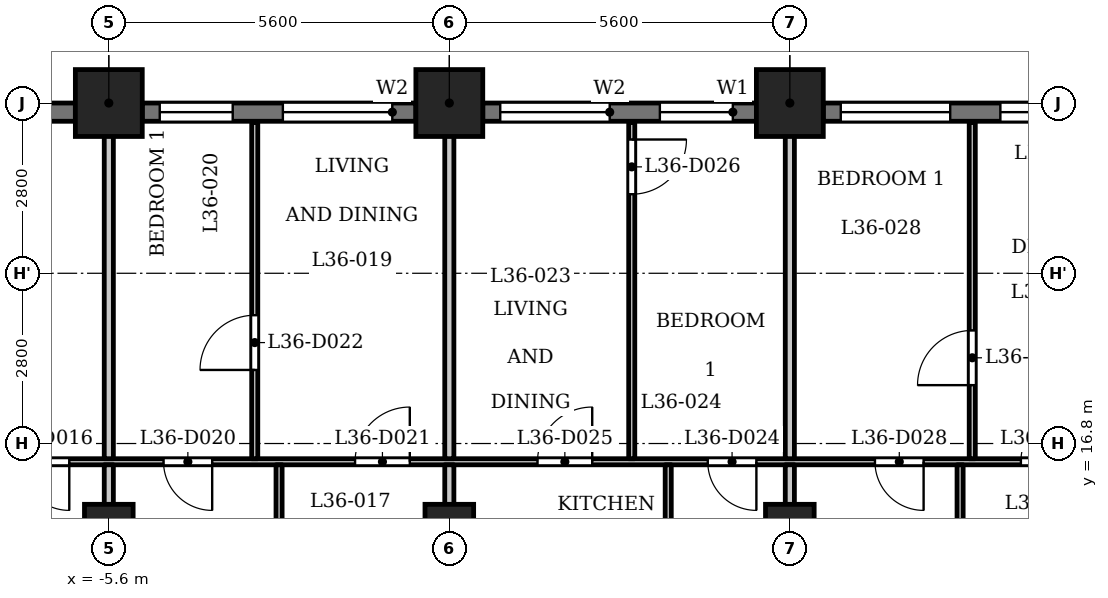
"""IFC4 building model, lengths in metres.
Left out: names, types, materials, properties, quantities, classifications, styles, units other than length and angle.
Written with IfcOpenShell. Run it as: python <this file> out.ifc"""

import sys

from ifc_helpers import new_model, si_unit, direction, frame, frame_2d, origin, origin_2d, place, context, subcontext, project, spatial, rectangle, extrude, element, fill, save


model = new_model("IFC4")
c1 = context("Model", 3, precision=1e-05, world=origin(), true_north=direction((0.0, 1.0)))
c2 = subcontext(c1, "Body", "Model", "MODEL_VIEW")
j1 = project(units=[si_unit("LENGTHUNIT", "METRE"), si_unit("PLANEANGLEUNIT", "RADIAN")], contexts=[c1])
p1 = place(None, origin())
s1 = spatial("IfcSite", under=j1, at=p1, CompositionType="ELEMENT")
p2 = place(p1, origin())
s2 = spatial("IfcBuilding", under=s1, at=p2, CompositionType="ELEMENT")
p3 = place(p2, frame((0.0, 0.0, 143.1)))
s3 = spatial("IfcBuildingStorey", under=s2, at=p3, CompositionType="ELEMENT", Elevation=143.1)
for number, where, z_axis, x_axis in (
    (1, (5.6, 22.4, 0.0), (0.0, 0.0, 1.0), (1.0, 0.0, 0.0)),
    (2, (0.0, 22.4, 0.0), (0.0, 0.0, 1.0), (1.0, 0.0, 0.0)),
    (3, (-5.6, 22.4, 0.0), (0.0, 0.0, 1.0), (1.0, 0.0, 0.0)),
):
    element("IfcColumn", number, at=place(p3, frame(where, z_axis=z_axis, x_axis=x_axis)), inside=s3, PredefinedType="COLUMN", context=c2, shape_type="SweptSolid", body=[
        extrude(rectangle(XDim=1.1, YDim=1.1, at=origin_2d()), origin(), (0.0, 0.0, 1.0), 3.5),
    ])
for number, where, z_axis, x_axis in (
    (4, (-5.6, 15.4, 0.0), (0.0, 0.0, 1.0), (1.0, 0.0, 0.0)),
    (5, (0.0, 15.4, 0.0), (0.0, 0.0, 1.0), (1.0, 0.0, 0.0)),
    (6, (5.6, 15.4, 0.0), (0.0, 0.0, 1.0), (1.0, 0.0, 0.0)),
):
    element("IfcColumn", number, at=place(p3, frame(where, z_axis=z_axis, x_axis=x_axis)), inside=s3, PredefinedType="COLUMN", context=c2, shape_type="SweptSolid", body=[
        extrude(rectangle(XDim=0.8, YDim=0.8, at=origin_2d()), origin(), (0.0, 0.0, 1.0), 3.5),
    ])
p4 = place(p3, frame((10.65, 22.25, 0.0), z_axis=(0.0, 0.0, 1.0), x_axis=(-1.0, 0.0, 0.0)))
e7 = element("IfcWall", 7, at=p4, inside=s3, PredefinedType="SOLIDWALL", context=c2, shape_type="SweptSolid", body=[
    extrude(rectangle(XDim=4.5, YDim=0.3, at=frame_2d((2.25, 0.0))), origin(), (0.0, 0.0, 1.0), 2.45),
])
p5 = place(p4, frame((0.387, 0.0, 0.6)))
e8 = element("IfcOpeningElement", 8, at=p5, cuts=e7, PredefinedType="OPENING", context=c2, shape_type="SweptSolid", body=[
    extrude(rectangle(XDim=1.2, YDim=1.55, at=frame_2d((0.6, 0.775))), frame((0.0, 0.16, 0.0), z_axis=(0.0, -1.0, 0.0), x_axis=(1.0, 0.0, 0.0)), (0.0, 0.0, 1.0), 0.32),
])
p6 = place(p4, frame((2.413, 0.0, 0.9)))
e9 = element("IfcOpeningElement", 9, at=p6, cuts=e7, PredefinedType="OPENING", context=c2, shape_type="SweptSolid", body=[
    extrude(rectangle(XDim=1.8, YDim=1.25, at=frame_2d((0.9, 0.625))), frame((0.0, 0.16, 0.0), z_axis=(0.0, -1.0, 0.0), x_axis=(1.0, 0.0, 0.0)), (0.0, 0.0, 1.0), 0.32),
])
p7 = place(p3, frame((5.05, 22.25, 0.0), z_axis=(0.0, 0.0, 1.0), x_axis=(-1.0, 0.0, 0.0)))
e10 = element("IfcWall", 10, at=p7, inside=s3, PredefinedType="SOLIDWALL", context=c2, shape_type="SweptSolid", body=[
    extrude(rectangle(XDim=4.5, YDim=0.3, at=frame_2d((2.25, 0.0))), origin(), (0.0, 0.0, 1.0), 2.45),
])
p8 = place(p7, frame((0.387, 0.0, 0.6)))
e11 = element("IfcOpeningElement", 11, at=p8, cuts=e10, PredefinedType="OPENING", context=c2, shape_type="SweptSolid", body=[
    extrude(rectangle(XDim=1.2, YDim=1.55, at=frame_2d((0.6, 0.775))), frame((0.0, 0.16, 0.0), z_axis=(0.0, -1.0, 0.0), x_axis=(1.0, 0.0, 0.0)), (0.0, 0.0, 1.0), 0.32),
])
p9 = place(p7, frame((2.413, 0.0, 0.9)))
e12 = element("IfcOpeningElement", 12, at=p9, cuts=e10, PredefinedType="OPENING", context=c2, shape_type="SweptSolid", body=[
    extrude(rectangle(XDim=1.8, YDim=1.25, at=frame_2d((0.9, 0.625))), frame((0.0, 0.16, 0.0), z_axis=(0.0, -1.0, 0.0), x_axis=(1.0, 0.0, 0.0)), (0.0, 0.0, 1.0), 0.32),
])
p10 = place(p3, frame((-0.55, 22.25, 0.0), z_axis=(0.0, 0.0, 1.0), x_axis=(-1.0, 0.0, 0.0)))
e13 = element("IfcWall", 13, at=p10, inside=s3, PredefinedType="SOLIDWALL", context=c2, shape_type="SweptSolid", body=[
    extrude(rectangle(XDim=4.5, YDim=0.3, at=frame_2d((2.25, 0.0))), origin(), (0.0, 0.0, 1.0), 2.45),
])
p11 = place(p10, frame((0.387, 0.0, 0.9)))
e14 = element("IfcOpeningElement", 14, at=p11, cuts=e13, PredefinedType="OPENING", context=c2, shape_type="SweptSolid", body=[
    extrude(rectangle(XDim=1.8, YDim=1.25, at=frame_2d((0.9, 0.625))), frame((0.0, 0.16, 0.0), z_axis=(0.0, -1.0, 0.0), x_axis=(1.0, 0.0, 0.0)), (0.0, 0.0, 1.0), 0.32),
])
p12 = place(p10, frame((3.012, 0.0, 0.6)))
e15 = element("IfcOpeningElement", 15, at=p12, cuts=e13, PredefinedType="OPENING", context=c2, shape_type="SweptSolid", body=[
    extrude(rectangle(XDim=1.2, YDim=1.55, at=frame_2d((0.6, 0.775))), frame((0.0, 0.16, 0.0), z_axis=(0.0, -1.0, 0.0), x_axis=(1.0, 0.0, 0.0)), (0.0, 0.0, 1.0), 0.32),
])
p13 = place(p3, frame((-6.15, 22.25, 0.0), z_axis=(0.0, 0.0, 1.0), x_axis=(-1.0, 0.0, 0.0)))
e16 = element("IfcWall", 16, at=p13, inside=s3, PredefinedType="SOLIDWALL", context=c2, shape_type="SweptSolid", body=[
    extrude(rectangle(XDim=4.5, YDim=0.3, at=frame_2d((2.25, 0.0))), origin(), (0.0, 0.0, 1.0), 2.45),
])
p14 = place(p13, frame((0.45, 0.0, 1.2)))
e17 = element("IfcOpeningElement", 17, at=p14, cuts=e16, PredefinedType="OPENING", context=c2, shape_type="SweptSolid", body=[
    extrude(rectangle(XDim=3.6, YDim=0.95, at=frame_2d((1.8, 0.475))), frame((0.0, 0.16, 0.0), z_axis=(0.0, -1.0, 0.0), x_axis=(1.0, 0.0, 0.0)), (0.0, 0.0, 1.0), 0.32),
])
p15 = place(p3, frame((-16.725, 16.5, 0.0), z_axis=(0.0, 0.0, 1.0), x_axis=(1.0, 0.0, 0.0)))
e18 = element("IfcWall", 18, at=p15, inside=s3, PredefinedType="PARTITIONING", context=c2, shape_type="SweptSolid", body=[
    extrude(rectangle(XDim=33.45, YDim=0.1, at=frame_2d((16.725, 0.0))), origin(), (0.0, 0.0, 1.0), 3.2),
])
p16 = place(p15, frame((9.675, 0.0, 0.0)))
e19 = element("IfcOpeningElement", 19, at=p16, cuts=e18, PredefinedType="OPENING", context=c2, shape_type="SweptSolid", body=[
    extrude(rectangle(XDim=0.8, YDim=2.1, at=frame_2d((0.4, 1.05))), frame((0.0, 0.06, 0.0), z_axis=(0.0, -1.0, 0.0), x_axis=(1.0, 0.0, 0.0)), (0.0, 0.0, 1.0), 0.12),
])
p17 = place(p15, frame((3.975, 0.0, 0.0)))
e20 = element("IfcOpeningElement", 20, at=p17, cuts=e18, PredefinedType="OPENING", context=c2, shape_type="SweptSolid", body=[
    extrude(rectangle(XDim=0.9, YDim=2.1, at=frame_2d((0.45, 1.05))), frame((0.0, 0.06, 0.0), z_axis=(0.0, -1.0, 0.0), x_axis=(1.0, 0.0, 0.0)), (0.0, 0.0, 1.0), 0.12),
])
p18 = place(p15, frame((12.025, 0.0, 0.0)))
e21 = element("IfcOpeningElement", 21, at=p18, cuts=e18, PredefinedType="OPENING", context=c2, shape_type="SweptSolid", body=[
    extrude(rectangle(XDim=0.8, YDim=2.1, at=frame_2d((0.4, 1.05))), frame((0.0, 0.06, 0.0), z_axis=(0.0, -1.0, 0.0), x_axis=(1.0, 0.0, 0.0)), (0.0, 0.0, 1.0), 0.12),
])
p19 = place(p15, frame((15.175, 0.0, 0.0)))
e22 = element("IfcOpeningElement", 22, at=p19, cuts=e18, PredefinedType="OPENING", context=c2, shape_type="SweptSolid", body=[
    extrude(rectangle(XDim=0.9, YDim=2.1, at=frame_2d((0.45, 1.05))), frame((0.0, 0.06, 0.0), z_axis=(0.0, -1.0, 0.0), x_axis=(1.0, 0.0, 0.0)), (0.0, 0.0, 1.0), 0.12),
])
p20 = place(p15, frame((20.975, 0.0, 0.0)))
e23 = element("IfcOpeningElement", 23, at=p20, cuts=e18, PredefinedType="OPENING", context=c2, shape_type="SweptSolid", body=[
    extrude(rectangle(XDim=0.8, YDim=2.1, at=frame_2d((0.4, 1.05))), frame((0.0, 0.06, 0.0), z_axis=(0.0, -1.0, 0.0), x_axis=(1.0, 0.0, 0.0)), (0.0, 0.0, 1.0), 0.12),
])
p21 = place(p15, frame((18.175, 0.0, 0.0)))
e24 = element("IfcOpeningElement", 24, at=p21, cuts=e18, PredefinedType="OPENING", context=c2, shape_type="SweptSolid", body=[
    extrude(rectangle(XDim=0.9, YDim=2.1, at=frame_2d((0.45, 1.05))), frame((0.0, 0.06, 0.0), z_axis=(0.0, -1.0, 0.0), x_axis=(1.0, 0.0, 0.0)), (0.0, 0.0, 1.0), 0.12),
])
p22 = place(p15, frame((23.725, 0.0, 0.0)))
e25 = element("IfcOpeningElement", 25, at=p22, cuts=e18, PredefinedType="OPENING", context=c2, shape_type="SweptSolid", body=[
    extrude(rectangle(XDim=0.8, YDim=2.1, at=frame_2d((0.4, 1.05))), frame((0.0, 0.06, 0.0), z_axis=(0.0, -1.0, 0.0), x_axis=(1.0, 0.0, 0.0)), (0.0, 0.0, 1.0), 0.12),
])
p23 = place(p15, frame((26.125, 0.0, 0.0)))
e26 = element("IfcOpeningElement", 26, at=p23, cuts=e18, PredefinedType="OPENING", context=c2, shape_type="SweptSolid", body=[
    extrude(rectangle(XDim=0.9, YDim=2.1, at=frame_2d((0.45, 1.05))), frame((0.0, 0.06, 0.0), z_axis=(0.0, -1.0, 0.0), x_axis=(1.0, 0.0, 0.0)), (0.0, 0.0, 1.0), 0.12),
])
p24 = place(p15, frame((32.125, 0.0, 0.0)))
e27 = element("IfcOpeningElement", 27, at=p24, cuts=e18, PredefinedType="OPENING", context=c2, shape_type="SweptSolid", body=[
    extrude(rectangle(XDim=0.8, YDim=2.1, at=frame_2d((0.4, 1.05))), frame((0.0, 0.06, 0.0), z_axis=(0.0, -1.0, 0.0), x_axis=(1.0, 0.0, 0.0)), (0.0, 0.0, 1.0), 0.12),
])
p25 = place(p15, frame((28.975, 0.0, 0.0)))
e28 = element("IfcOpeningElement", 28, at=p25, cuts=e18, PredefinedType="OPENING", context=c2, shape_type="SweptSolid", body=[
    extrude(rectangle(XDim=0.9, YDim=2.1, at=frame_2d((0.45, 1.05))), frame((0.0, 0.06, 0.0), z_axis=(0.0, -1.0, 0.0), x_axis=(1.0, 0.0, 0.0)), (0.0, 0.0, 1.0), 0.12),
])
p26 = place(p3, frame((-5.6, 13.275, 0.0), z_axis=(0.0, 0.0, 1.0), x_axis=(0.0, 1.0, 0.0)))
e29 = element("IfcWall", 29, at=p26, inside=s3, PredefinedType="PARTITIONING", context=c2, shape_type="SweptSolid", body=[
    extrude(rectangle(XDim=3.175, YDim=0.15, at=frame_2d((1.587, 0.0))), origin(), (0.0, 0.0, 1.0), 3.2),
])
p27 = place(p3, frame((-5.6, 16.55, 0.0), z_axis=(0.0, 0.0, 1.0), x_axis=(0.0, 1.0, 0.0)))
e30 = element("IfcWall", 30, at=p27, inside=s3, PredefinedType="PARTITIONING", context=c2, shape_type="SweptSolid", body=[
    extrude(rectangle(XDim=6.38, YDim=0.15, at=frame_2d((3.19, 0.0))), origin(), (0.0, 0.0, 1.0), 3.2),
])
p28 = place(p3, frame((-3.2, 16.55, 0.0), z_axis=(0.0, 0.0, 1.0), x_axis=(0.0, 1.0, 0.0)))
e31 = element("IfcWall", 31, at=p28, inside=s3, PredefinedType="PARTITIONING", context=c2, shape_type="SweptSolid", body=[
    extrude(rectangle(XDim=5.53, YDim=0.1, at=frame_2d((2.765, 0.0))), origin(), (0.0, 0.0, 1.0), 3.2),
])
p29 = place(p28, frame((1.46, 0.0, 0.0)))
e32 = element("IfcOpeningElement", 32, at=p29, cuts=e31, PredefinedType="OPENING", context=c2, shape_type="SweptSolid", body=[
    extrude(rectangle(XDim=0.9, YDim=2.1, at=frame_2d((0.45, 1.05))), frame((0.0, 0.06, 0.0), z_axis=(0.0, -1.0, 0.0), x_axis=(1.0, 0.0, 0.0)), (0.0, 0.0, 1.0), 0.12),
])
p30 = place(p3, frame((-2.8, 13.275, 0.0), z_axis=(0.0, 0.0, 1.0), x_axis=(0.0, 1.0, 0.0)))
e33 = element("IfcWall", 33, at=p30, inside=s3, PredefinedType="PARTITIONING", context=c2, shape_type="SweptSolid", body=[
    extrude(rectangle(XDim=3.175, YDim=0.1, at=frame_2d((1.587, 0.0))), origin(), (0.0, 0.0, 1.0), 3.2),
])
p31 = place(p3, frame((0.0, 13.275, 0.0), z_axis=(0.0, 0.0, 1.0), x_axis=(0.0, 1.0, 0.0)))
e34 = element("IfcWall", 34, at=p31, inside=s3, PredefinedType="PARTITIONING", context=c2, shape_type="SweptSolid", body=[
    extrude(rectangle(XDim=3.175, YDim=0.15, at=frame_2d((1.587, 0.0))), origin(), (0.0, 0.0, 1.0), 3.2),
])
p32 = place(p3, frame((0.0, 16.55, 0.0), z_axis=(0.0, 0.0, 1.0), x_axis=(0.0, 1.0, 0.0)))
e35 = element("IfcWall", 35, at=p32, inside=s3, PredefinedType="PARTITIONING", context=c2, shape_type="SweptSolid", body=[
    extrude(rectangle(XDim=6.38, YDim=0.15, at=frame_2d((3.19, 0.0))), origin(), (0.0, 0.0, 1.0), 3.2),
])
p33 = place(p3, frame((3.0, 16.55, 0.0), z_axis=(0.0, 0.0, 1.0), x_axis=(0.0, 1.0, 0.0)))
e36 = element("IfcWall", 36, at=p33, inside=s3, PredefinedType="PARTITIONING", context=c2, shape_type="SweptSolid", body=[
    extrude(rectangle(XDim=5.53, YDim=0.1, at=frame_2d((2.765, 0.0))), origin(), (0.0, 0.0, 1.0), 3.2),
])
p34 = place(p33, frame((4.35, 0.0, 0.0)))
e37 = element("IfcOpeningElement", 37, at=p34, cuts=e36, PredefinedType="OPENING", context=c2, shape_type="SweptSolid", body=[
    extrude(rectangle(XDim=0.9, YDim=2.1, at=frame_2d((0.45, 1.05))), frame((0.0, 0.06, 0.0), z_axis=(0.0, -1.0, 0.0), x_axis=(1.0, 0.0, 0.0)), (0.0, 0.0, 1.0), 0.12),
])
p35 = place(p3, frame((3.6, 13.275, 0.0), z_axis=(0.0, 0.0, 1.0), x_axis=(0.0, 1.0, 0.0)))
e38 = element("IfcWall", 38, at=p35, inside=s3, PredefinedType="PARTITIONING", context=c2, shape_type="SweptSolid", body=[
    extrude(rectangle(XDim=3.175, YDim=0.1, at=frame_2d((1.587, 0.0))), origin(), (0.0, 0.0, 1.0), 3.2),
])
p36 = place(p3, frame((5.6, 13.275, 0.0), z_axis=(0.0, 0.0, 1.0), x_axis=(0.0, 1.0, 0.0)))
e39 = element("IfcWall", 39, at=p36, inside=s3, PredefinedType="PARTITIONING", context=c2, shape_type="SweptSolid", body=[
    extrude(rectangle(XDim=3.175, YDim=0.15, at=frame_2d((1.587, 0.0))), origin(), (0.0, 0.0, 1.0), 3.2),
])
p37 = place(p3, frame((5.6, 16.55, 0.0), z_axis=(0.0, 0.0, 1.0), x_axis=(0.0, 1.0, 0.0)))
e40 = element("IfcWall", 40, at=p37, inside=s3, PredefinedType="PARTITIONING", context=c2, shape_type="SweptSolid", body=[
    extrude(rectangle(XDim=6.38, YDim=0.15, at=frame_2d((3.19, 0.0))), origin(), (0.0, 0.0, 1.0), 3.2),
])
p38 = place(p3, frame((8.4, 13.275, 0.0), z_axis=(0.0, 0.0, 1.0), x_axis=(0.0, 1.0, 0.0)))
e41 = element("IfcWall", 41, at=p38, inside=s3, PredefinedType="PARTITIONING", context=c2, shape_type="SweptSolid", body=[
    extrude(rectangle(XDim=3.175, YDim=0.1, at=frame_2d((1.587, 0.0))), origin(), (0.0, 0.0, 1.0), 3.2),
])
p39 = place(p3, frame((8.6, 16.55, 0.0), z_axis=(0.0, 0.0, 1.0), x_axis=(0.0, 1.0, 0.0)))
e42 = element("IfcWall", 42, at=p39, inside=s3, PredefinedType="PARTITIONING", context=c2, shape_type="SweptSolid", body=[
    extrude(rectangle(XDim=5.53, YDim=0.1, at=frame_2d((2.765, 0.0))), origin(), (0.0, 0.0, 1.0), 3.2),
])
p40 = place(p39, frame((1.21, 0.0, 0.0)))
e43 = element("IfcOpeningElement", 43, at=p40, cuts=e42, PredefinedType="OPENING", context=c2, shape_type="SweptSolid", body=[
    extrude(rectangle(XDim=0.9, YDim=2.1, at=frame_2d((0.45, 1.05))), frame((0.0, 0.06, 0.0), z_axis=(0.0, -1.0, 0.0), x_axis=(1.0, 0.0, 0.0)), (0.0, 0.0, 1.0), 0.12),
])
p41 = place(p16, origin())
e44 = element("IfcDoor", 44, at=p41, inside=s3, OperationType="SINGLE_SWING_RIGHT", PredefinedType="DOOR", context=c2, shape_type="SweptSolid", body=[
    extrude(rectangle(XDim=0.8, YDim=2.1, at=frame_2d((0.4, 1.05))), frame((0.0, 0.025, 0.0), z_axis=(0.0, -1.0, 0.0), x_axis=(1.0, 0.0, 0.0)), (0.0, 0.0, 1.0), 0.05),
])
fill(e19, e44)
p42 = place(p18, origin())
e45 = element("IfcDoor", 45, at=p42, inside=s3, OperationType="SINGLE_SWING_RIGHT", PredefinedType="DOOR", context=c2, shape_type="SweptSolid", body=[
    extrude(rectangle(XDim=0.8, YDim=2.1, at=frame_2d((0.4, 1.05))), frame((0.0, 0.025, 0.0), z_axis=(0.0, -1.0, 0.0), x_axis=(1.0, 0.0, 0.0)), (0.0, 0.0, 1.0), 0.05),
])
fill(e21, e45)
p43 = place(p19, origin())
e46 = element("IfcDoor", 46, at=p43, inside=s3, OperationType="SINGLE_SWING_LEFT", PredefinedType="DOOR", context=c2, shape_type="SweptSolid", body=[
    extrude(rectangle(XDim=0.9, YDim=2.1, at=frame_2d((0.45, 1.05))), frame((0.0, 0.025, 0.0), z_axis=(0.0, -1.0, 0.0), x_axis=(1.0, 0.0, 0.0)), (0.0, 0.0, 1.0), 0.05),
])
fill(e22, e46)
p44 = place(p29, origin())
e47 = element("IfcDoor", 47, at=p44, inside=s3, OperationType="SINGLE_SWING_RIGHT", PredefinedType="DOOR", context=c2, shape_type="SweptSolid", body=[
    extrude(rectangle(XDim=0.9, YDim=2.1, at=frame_2d((0.45, 1.05))), frame((0.0, 0.025, 0.0), z_axis=(0.0, -1.0, 0.0), x_axis=(1.0, 0.0, 0.0)), (0.0, 0.0, 1.0), 0.05),
])
fill(e32, e47)
p45 = place(p20, origin())
e48 = element("IfcDoor", 48, at=p45, inside=s3, OperationType="SINGLE_SWING_RIGHT", PredefinedType="DOOR", context=c2, shape_type="SweptSolid", body=[
    extrude(rectangle(XDim=0.8, YDim=2.1, at=frame_2d((0.4, 1.05))), frame((0.0, 0.025, 0.0), z_axis=(0.0, -1.0, 0.0), x_axis=(1.0, 0.0, 0.0)), (0.0, 0.0, 1.0), 0.05),
])
fill(e23, e48)
p46 = place(p21, origin())
e49 = element("IfcDoor", 49, at=p46, inside=s3, OperationType="SINGLE_SWING_LEFT", PredefinedType="DOOR", context=c2, shape_type="SweptSolid", body=[
    extrude(rectangle(XDim=0.9, YDim=2.1, at=frame_2d((0.45, 1.05))), frame((0.0, 0.025, 0.0), z_axis=(0.0, -1.0, 0.0), x_axis=(1.0, 0.0, 0.0)), (0.0, 0.0, 1.0), 0.05),
])
fill(e24, e49)
p47 = place(p34, origin())
e50 = element("IfcDoor", 50, at=p47, inside=s3, OperationType="SINGLE_SWING_RIGHT", PredefinedType="DOOR", context=c2, shape_type="SweptSolid", body=[
    extrude(rectangle(XDim=0.9, YDim=2.1, at=frame_2d((0.45, 1.05))), frame((0.0, 0.025, 0.0), z_axis=(0.0, -1.0, 0.0), x_axis=(1.0, 0.0, 0.0)), (0.0, 0.0, 1.0), 0.05),
])
fill(e37, e50)
p48 = place(p22, origin())
e51 = element("IfcDoor", 51, at=p48, inside=s3, OperationType="SINGLE_SWING_RIGHT", PredefinedType="DOOR", context=c2, shape_type="SweptSolid", body=[
    extrude(rectangle(XDim=0.8, YDim=2.1, at=frame_2d((0.4, 1.05))), frame((0.0, 0.025, 0.0), z_axis=(0.0, -1.0, 0.0), x_axis=(1.0, 0.0, 0.0)), (0.0, 0.0, 1.0), 0.05),
])
fill(e25, e51)
p49 = place(p23, origin())
e52 = element("IfcDoor", 52, at=p49, inside=s3, OperationType="SINGLE_SWING_LEFT", PredefinedType="DOOR", context=c2, shape_type="SweptSolid", body=[
    extrude(rectangle(XDim=0.9, YDim=2.1, at=frame_2d((0.45, 1.05))), frame((0.0, 0.025, 0.0), z_axis=(0.0, -1.0, 0.0), x_axis=(1.0, 0.0, 0.0)), (0.0, 0.0, 1.0), 0.05),
])
fill(e26, e52)
p50 = place(p40, origin())
e53 = element("IfcDoor", 53, at=p50, inside=s3, OperationType="SINGLE_SWING_RIGHT", PredefinedType="DOOR", context=c2, shape_type="SweptSolid", body=[
    extrude(rectangle(XDim=0.9, YDim=2.1, at=frame_2d((0.45, 1.05))), frame((0.0, 0.025, 0.0), z_axis=(0.0, -1.0, 0.0), x_axis=(1.0, 0.0, 0.0)), (0.0, 0.0, 1.0), 0.05),
])
fill(e43, e53)
p51 = place(p5, origin())
e54 = element("IfcWindow", 54, at=p51, inside=s3, PartitioningType="SINGLE_PANEL", PredefinedType="WINDOW", context=c2, shape_type="SweptSolid", body=[
    extrude(rectangle(XDim=1.2, YDim=1.55, at=frame_2d((0.6, 0.775))), frame((0.0, 0.03, 0.0), z_axis=(0.0, -1.0, 0.0), x_axis=(1.0, 0.0, 0.0)), (0.0, 0.0, 1.0), 0.06),
])
fill(e8, e54)
p52 = place(p6, origin())
e55 = element("IfcWindow", 55, at=p52, inside=s3, PartitioningType="SINGLE_PANEL", PredefinedType="WINDOW", context=c2, shape_type="SweptSolid", body=[
    extrude(rectangle(XDim=1.8, YDim=1.25, at=frame_2d((0.9, 0.625))), frame((0.0, 0.03, 0.0), z_axis=(0.0, -1.0, 0.0), x_axis=(1.0, 0.0, 0.0)), (0.0, 0.0, 1.0), 0.06),
])
fill(e9, e55)
p53 = place(p8, origin())
e56 = element("IfcWindow", 56, at=p53, inside=s3, PartitioningType="SINGLE_PANEL", PredefinedType="WINDOW", context=c2, shape_type="SweptSolid", body=[
    extrude(rectangle(XDim=1.2, YDim=1.55, at=frame_2d((0.6, 0.775))), frame((0.0, 0.03, 0.0), z_axis=(0.0, -1.0, 0.0), x_axis=(1.0, 0.0, 0.0)), (0.0, 0.0, 1.0), 0.06),
])
fill(e11, e56)
p54 = place(p9, origin())
e57 = element("IfcWindow", 57, at=p54, inside=s3, PartitioningType="SINGLE_PANEL", PredefinedType="WINDOW", context=c2, shape_type="SweptSolid", body=[
    extrude(rectangle(XDim=1.8, YDim=1.25, at=frame_2d((0.9, 0.625))), frame((0.0, 0.03, 0.0), z_axis=(0.0, -1.0, 0.0), x_axis=(1.0, 0.0, 0.0)), (0.0, 0.0, 1.0), 0.06),
])
fill(e12, e57)
p55 = place(p11, origin())
e58 = element("IfcWindow", 58, at=p55, inside=s3, PartitioningType="SINGLE_PANEL", PredefinedType="WINDOW", context=c2, shape_type="SweptSolid", body=[
    extrude(rectangle(XDim=1.8, YDim=1.25, at=frame_2d((0.9, 0.625))), frame((0.0, 0.03, 0.0), z_axis=(0.0, -1.0, 0.0), x_axis=(1.0, 0.0, 0.0)), (0.0, 0.0, 1.0), 0.06),
])
fill(e14, e58)
p56 = place(p12, origin())
e59 = element("IfcWindow", 59, at=p56, inside=s3, PartitioningType="SINGLE_PANEL", PredefinedType="WINDOW", context=c2, shape_type="SweptSolid", body=[
    extrude(rectangle(XDim=1.2, YDim=1.55, at=frame_2d((0.6, 0.775))), frame((0.0, 0.03, 0.0), z_axis=(0.0, -1.0, 0.0), x_axis=(1.0, 0.0, 0.0)), (0.0, 0.0, 1.0), 0.06),
])
fill(e15, e59)
save(model, sys.argv[1])
